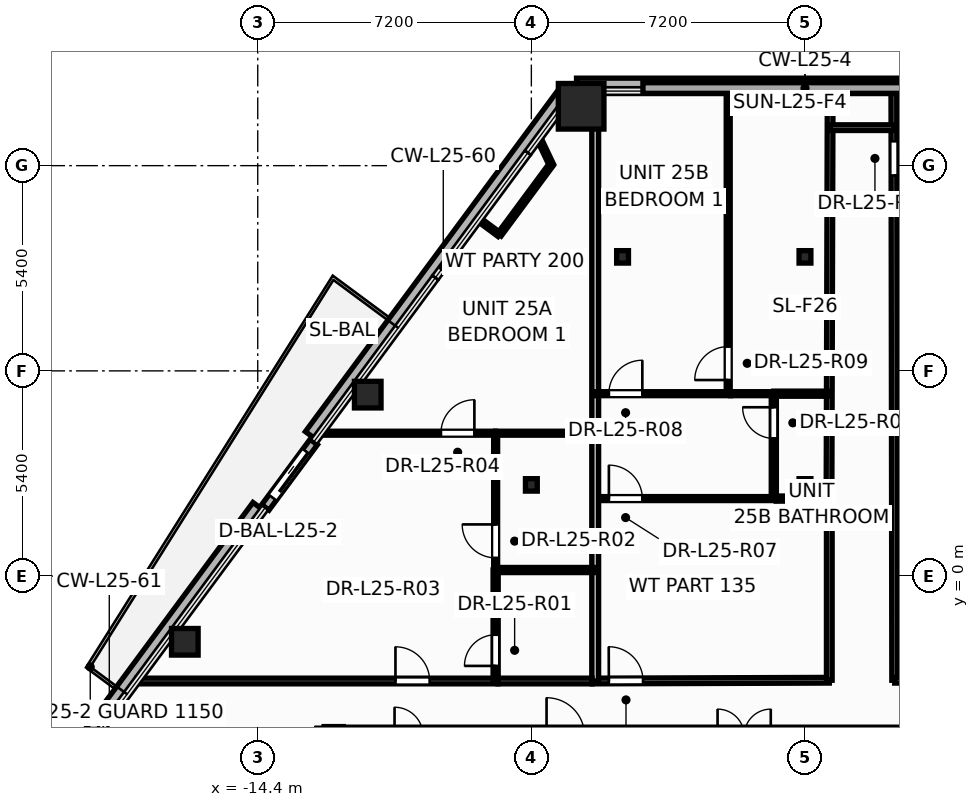
"""IFC4 building model, lengths in metres.
Left out: names, types, materials, properties, quantities, classifications, styles, units other than length and angle.
Written with IfcOpenShell. Run it as: python <this file> out.ifc"""

import sys

from ifc_helpers import new_model, si_unit, direction, frame, frame_2d, origin, origin_2d, place, context, subcontext, project, spatial, rectangle, hollow_rectangle, hollow_circle, i_section, extrude, element, fill, save


model = new_model("IFC4")
c1 = context("Model", 3, precision=1e-05, world=origin(), true_north=direction((0.0, 1.0)))
c2 = subcontext(c1, "Body", "Model", "MODEL_VIEW")
j1 = project(units=[si_unit("LENGTHUNIT", "METRE"), si_unit("PLANEANGLEUNIT", "RADIAN")], contexts=[c1])
p1 = place(None, origin())
s1 = spatial("IfcSite", under=j1, at=p1, CompositionType="ELEMENT")
p2 = place(p1, origin())
s2 = spatial("IfcBuilding", under=s1, at=p2, CompositionType="ELEMENT")
p3 = place(p2, frame((0.0, 0.0, 99.6)))
s3 = spatial("IfcBuildingStorey", under=s2, at=p3, CompositionType="ELEMENT", Elevation=99.6)
p4 = place(p3, frame((-5.89, 12.362, 0.0), z_axis=(0.0, 0.0, 1.0), x_axis=(1.0, 0.0, 0.0)))
e1 = element("IfcColumn", 1, at=p4, inside=s3, PredefinedType="COLUMN", context=c2, shape_type="SweptSolid", body=[
    extrude(hollow_rectangle(XDim=1.2, YDim=1.2, WallThickness=0.055, at=origin_2d()), origin(), (0.0, 0.0, 1.0), 3.6),
])
for number, where, z_axis, x_axis in (
    (2, (-11.506, 4.775, 0.0), (0.0, 0.0, 1.0), (1.0, 0.0, 0.0)),
    (3, (-16.319, -1.729, 0.0), (0.0, 0.0, 1.0), (1.0, 0.0, 0.0)),
):
    element("IfcColumn", number, at=place(p3, frame(where, z_axis=z_axis, x_axis=x_axis)), inside=s3, PredefinedType="COLUMN", context=c2, shape_type="SweptSolid", body=[
        extrude(hollow_circle(Radius=0.35, WallThickness=0.03, at=origin_2d()), origin(), (0.0, 0.0, 1.0), 3.6),
    ])
p5 = place(p3, frame((-12.4, -4.2, 0.0), z_axis=(0.0, 0.0, 1.0), x_axis=(1.0, 0.0, 0.0)))
e4 = element("IfcColumn", 4, at=p5, inside=s3, PredefinedType="COLUMN", context=c2, shape_type="SweptSolid", body=[
    extrude(i_section(OverallWidth=0.5, OverallDepth=0.482, WebThickness=0.04, FlangeThickness=0.045, at=origin_2d()), origin(), (0.0, 0.0, 1.0), 3.6),
])
for number, where, z_axis, x_axis in (
    (5, (-7.2, 2.4, 0.0), (0.0, 0.0, 1.0), (1.0, 0.0, 0.0)),
    (6, (0.0, 2.4, 0.0), (0.0, 0.0, 1.0), (1.0, 0.0, 0.0)),
    (7, (-4.8, 8.4, 0.0), (0.0, 0.0, 1.0), (1.0, 0.0, 0.0)),
    (8, (0.0, 8.4, 0.0), (0.0, 0.0, 1.0), (1.0, 0.0, 0.0)),
):
    element("IfcColumn", number, at=place(p3, frame(where, z_axis=z_axis, x_axis=x_axis)), inside=s3, PredefinedType="COLUMN", context=c2, shape_type="SweptSolid", body=[
        extrude(i_section(OverallWidth=0.311, OverallDepth=0.327, WebThickness=0.016, FlangeThickness=0.025, at=origin_2d()), origin(), (0.0, 0.0, 1.0), 3.6),
    ])
p6 = place(p3, frame((6.012, 12.922, -0.2), z_axis=(0.0, 0.0, 1.0), x_axis=(-1.0, 0.0, 0.0)))
e9 = element("IfcWall", 9, at=p6, inside=s3, PredefinedType="PARAPET", context=c2, shape_type="SweptSolid", body=[
    extrude(rectangle(XDim=12.023, YDim=0.36, at=frame_2d((6.012, 0.0))), origin(), (0.0, 0.0, 1.0), 0.38),
])
p7 = place(p3, frame((-6.292, 12.761, -0.2), z_axis=(0.0, 0.0, 1.0), x_axis=(-0.594907064231, -0.803794491725, 0.0)))
e10 = element("IfcWall", 10, at=p7, inside=s3, PredefinedType="PARAPET", context=c2, shape_type="SweptSolid", body=[
    extrude(rectangle(XDim=11.279, YDim=0.36, at=frame_2d((5.639, 0.0))), origin(), (0.0, 0.0, 1.0), 0.38),
])
p8 = place(p3, frame((-14.381, 1.831, -0.2), z_axis=(0.0, 0.0, 1.0), x_axis=(-0.594911761431, -0.803791015197, 0.0)))
e11 = element("IfcWall", 11, at=p8, inside=s3, PredefinedType="PARAPET", context=c2, shape_type="SweptSolid", body=[
    extrude(rectangle(XDim=13.628, YDim=0.36, at=frame_2d((6.814, 0.0))), origin(), (0.0, 0.0, 1.0), 0.38),
])
p9 = place(p3, frame((-12.926, 3.528, -0.015), z_axis=(0.0, 0.0, 1.0), x_axis=(-0.594840056707, -0.803844081235, 0.0)))
e12 = element("IfcWall", 12, at=p9, inside=s3, PredefinedType="STANDARD", context=c2, shape_type="SweptSolid", body=[
    extrude(rectangle(XDim=2.14, YDim=0.24, at=frame_2d((1.07, 0.0))), origin(), (0.0, 0.0, 1.0), 2.729),
])
p10 = place(p9, frame((0.32, 0.0, 0.015)))
e13 = element("IfcOpeningElement", 13, at=p10, cuts=e12, PredefinedType="OPENING", context=c2, shape_type="SweptSolid", body=[
    extrude(rectangle(XDim=1.506, YDim=2.204, at=frame_2d((0.75, 1.102))), frame((0.0, 0.13, 0.0), z_axis=(0.0, -1.0, 0.0), x_axis=(1.0, 0.0, 0.0)), (0.0, 0.0, 1.0), 0.26),
])
p11 = place(p3, frame((-12.65, -4.2, 0.0), z_axis=(0.0, 0.0, 1.0), x_axis=(1.0, 0.0, 0.0)))
e14 = element("IfcWall", 14, at=p11, inside=s3, PredefinedType="SHEAR", context=c2, shape_type="SweptSolid", body=[
    extrude(rectangle(XDim=25.3, YDim=0.45, at=frame_2d((12.65, 0.0))), origin(), (0.0, 0.0, 1.0), 3.6),
])
p12 = place(p11, frame((1.85, 0.0, 0.0)))
e15 = element("IfcOpeningElement", 15, at=p12, cuts=e14, PredefinedType="OPENING", context=c2, shape_type="SweptSolid", body=[
    extrude(rectangle(XDim=0.756, YDim=2.054, at=frame_2d((0.375, 1.027))), frame((0.0, 0.235, 0.0), z_axis=(0.0, -1.0, 0.0), x_axis=(1.0, 0.0, 0.0)), (0.0, 0.0, 1.0), 0.47),
])
p13 = place(p11, frame((21.85, 0.0, 0.0)))
e16 = element("IfcOpeningElement", 16, at=p13, cuts=e14, PredefinedType="OPENING", context=c2, shape_type="SweptSolid", body=[
    extrude(rectangle(XDim=0.756, YDim=2.054, at=frame_2d((0.375, 1.027))), frame((0.0, 0.235, 0.0), z_axis=(0.0, -1.0, 0.0), x_axis=(1.0, 0.0, 0.0)), (0.0, 0.0, 1.0), 0.47),
])
p14 = place(p11, frame((23.5, 0.0, 0.0)))
e17 = element("IfcOpeningElement", 17, at=p14, cuts=e14, PredefinedType="OPENING", context=c2, shape_type="SweptSolid", body=[
    extrude(rectangle(XDim=0.756, YDim=2.054, at=frame_2d((0.375, 1.027))), frame((0.0, 0.235, 0.0), z_axis=(0.0, -1.0, 0.0), x_axis=(1.0, 0.0, 0.0)), (0.0, 0.0, 1.0), 0.47),
])
p15 = place(p11, frame((5.85, 0.0, 0.0)))
e18 = element("IfcOpeningElement", 18, at=p15, cuts=e14, PredefinedType="OPENING", context=c2, shape_type="SweptSolid", body=[
    extrude(rectangle(XDim=1.006, YDim=2.104, at=frame_2d((0.5, 1.052))), frame((0.0, 0.235, 0.0), z_axis=(0.0, -1.0, 0.0), x_axis=(1.0, 0.0, 0.0)), (0.0, 0.0, 1.0), 0.47),
])
p16 = place(p11, frame((10.35, 0.0, 0.0)))
e19 = element("IfcOpeningElement", 19, at=p16, cuts=e14, PredefinedType="OPENING", context=c2, shape_type="SweptSolid", body=[
    extrude(rectangle(XDim=1.406, YDim=2.154, at=frame_2d((0.7, 1.077))), frame((0.0, 0.235, 0.0), z_axis=(0.0, -1.0, 0.0), x_axis=(1.0, 0.0, 0.0)), (0.0, 0.0, 1.0), 0.47),
])
p17 = place(p11, frame((18.45, 0.0, 0.0)))
e20 = element("IfcOpeningElement", 20, at=p17, cuts=e14, PredefinedType="OPENING", context=c2, shape_type="SweptSolid", body=[
    extrude(rectangle(XDim=1.006, YDim=2.104, at=frame_2d((0.5, 1.052))), frame((0.0, 0.235, 0.0), z_axis=(0.0, -1.0, 0.0), x_axis=(1.0, 0.0, 0.0)), (0.0, 0.0, 1.0), 0.47),
])
p18 = place(p3, frame((2.339, 12.762, 0.0), z_axis=(0.0, 0.0, 1.0), x_axis=(0.001385890916, -0.999999039653, 0.0)))
e21 = element("IfcWall", 21, at=p18, inside=s3, PredefinedType="PARTITIONING", context=c2, shape_type="SweptSolid", body=[
    extrude(rectangle(XDim=15.502, YDim=0.15, at=frame_2d((7.751, 0.0))), origin(), (0.0, 0.0, 1.0), 2.325),
])
p19 = place(p18, frame((1.322, 0.0, 0.0)))
e22 = element("IfcOpeningElement", 22, at=p19, cuts=e21, PredefinedType="OPENING", context=c2, shape_type="SweptSolid", body=[
    extrude(rectangle(XDim=0.906, YDim=2.104, at=frame_2d((0.45, 1.052))), frame((0.0, 0.085, 0.0), z_axis=(0.0, -1.0, 0.0), x_axis=(1.0, 0.0, 0.0)), (0.0, 0.0, 1.0), 0.17),
])
p20 = place(p3, frame((-17.58, -2.76, 0.0), z_axis=(0.0, 0.0, 1.0), x_axis=(1.0, 0.0, 0.0)))
e23 = element("IfcWall", 23, at=p20, inside=s3, PredefinedType="PARTITIONING", context=c2, shape_type="SweptSolid", body=[
    extrude(rectangle(XDim=9.5, YDim=0.15, at=frame_2d((4.75, 0.0))), origin(), (0.0, 0.0, 1.0), 2.713),
])
p21 = place(p20, frame((6.804, 0.0, 0.0)))
e24 = element("IfcOpeningElement", 24, at=p21, cuts=e23, PredefinedType="OPENING", context=c2, shape_type="SweptSolid", body=[
    extrude(rectangle(XDim=0.906, YDim=2.104, at=frame_2d((0.45, 1.052))), frame((0.0, 0.085, 0.0), z_axis=(0.0, -1.0, 0.0), x_axis=(1.0, 0.0, 0.0)), (0.0, 0.0, 1.0), 0.17),
])
p22 = place(p3, frame((0.632, 1.98, 0.0), z_axis=(0.0, 0.0, 1.0), x_axis=(0.002830348232, 0.999995994556, 0.0)))
e25 = element("IfcWall", 25, at=p22, inside=s3, PredefinedType="PARTITIONING", context=c2, shape_type="SweptSolid", body=[
    extrude(rectangle(XDim=10.782, YDim=0.15, at=frame_2d((5.391, 0.0))), origin(), (0.0, 0.0, 1.0), 2.325),
])
p23 = place(p3, frame((-5.52, 3.76, 0.0), z_axis=(0.0, 0.0, 1.0), x_axis=(0.0, 1.0, 0.0)))
e26 = element("IfcWall", 26, at=p23, inside=s3, PredefinedType="PARTITIONING", context=c2, shape_type="SweptSolid", body=[
    extrude(rectangle(XDim=9.002, YDim=0.18, at=frame_2d((4.501, 0.0))), origin(), (0.0, 0.0, 1.0), 2.617),
])
p24 = place(p3, frame((-2.02, 4.8, 0.0), z_axis=(0.0, 0.0, 1.0), x_axis=(0.0, 1.0, 0.0)))
e27 = element("IfcWall", 27, at=p24, inside=s3, PredefinedType="PARTITIONING", context=c2, shape_type="SweptSolid", body=[
    extrude(rectangle(XDim=7.962, YDim=0.105, at=frame_2d((3.981, 0.0))), origin(), (0.0, 0.0, 1.0), 2.617),
])
p25 = place(p24, frame((0.359, 0.0, 0.0)))
e28 = element("IfcOpeningElement", 28, at=p25, cuts=e27, PredefinedType="OPENING", context=c2, shape_type="SweptSolid", body=[
    extrude(rectangle(XDim=0.886, YDim=2.104, at=frame_2d((0.44, 1.052))), frame((0.0, 0.062, 0.0), z_axis=(0.0, -1.0, 0.0), x_axis=(1.0, 0.0, 0.0)), (0.0, 0.0, 1.0), 0.125),
])
p26 = place(p3, frame((-5.6, -2.76, 0.0), z_axis=(0.0, 0.0, 1.0), x_axis=(0.999994853563, 0.003208246723, 0.0)))
e29 = element("IfcWall", 29, at=p26, inside=s3, PredefinedType="PARTITIONING", context=c2, shape_type="SweptSolid", body=[
    extrude(rectangle(XDim=6.24, YDim=0.15, at=frame_2d((3.12, 0.0))), origin(), (0.0, 0.0, 1.0), 2.325),
])
p27 = place(p26, frame((0.439, 0.0, 0.0)))
e30 = element("IfcOpeningElement", 30, at=p27, cuts=e29, PredefinedType="OPENING", context=c2, shape_type="SweptSolid", body=[
    extrude(rectangle(XDim=0.906, YDim=2.104, at=frame_2d((0.45, 1.052))), frame((0.0, 0.085, 0.0), z_axis=(0.0, -1.0, 0.0), x_axis=(1.0, 0.0, 0.0)), (0.0, 0.0, 1.0), 0.17),
])
p28 = place(p3, frame((0.64, -2.74, 0.0), z_axis=(0.0, 0.0, 1.0), x_axis=(0.0, 1.0, 0.0)))
e31 = element("IfcWall", 31, at=p28, inside=s3, PredefinedType="PARTITIONING", context=c2, shape_type="SweptSolid", body=[
    extrude(rectangle(XDim=4.718, YDim=0.15, at=frame_2d((2.359, 0.0))), origin(), (0.0, 0.0, 1.0), 3.35),
])
p29 = place(p3, frame((-5.52, 2.04, 0.0), z_axis=(0.0, 0.0, 1.0), x_axis=(1.0, 0.0, 0.0)))
e32 = element("IfcWall", 32, at=p29, inside=s3, PredefinedType="PARTITIONING", context=c2, shape_type="SweptSolid", body=[
    extrude(rectangle(XDim=4.76, YDim=0.105, at=frame_2d((2.38, 0.0))), origin(), (0.0, 0.0, 1.0), 2.918),
])
p30 = place(p29, frame((0.36, 0.0, 0.0)))
e33 = element("IfcOpeningElement", 33, at=p30, cuts=e32, PredefinedType="OPENING", context=c2, shape_type="SweptSolid", body=[
    extrude(rectangle(XDim=0.886, YDim=2.104, at=frame_2d((0.44, 1.052))), frame((0.0, 0.062, 0.0), z_axis=(0.0, -1.0, 0.0), x_axis=(1.0, 0.0, 0.0)), (0.0, 0.0, 1.0), 0.125),
])
p31 = place(p3, frame((2.36, -2.74, 0.0), z_axis=(0.0, 0.0, 1.0), x_axis=(0.999991056007, -0.0042294097, 0.0)))
e34 = element("IfcWall", 34, at=p31, inside=s3, PredefinedType="PARTITIONING", context=c2, shape_type="SweptSolid", body=[
    extrude(rectangle(XDim=4.618, YDim=0.15, at=frame_2d((2.309, 0.0))), origin(), (0.0, 0.0, 1.0), 2.918),
])
p32 = place(p3, frame((-12.754, 3.76, 0.0), z_axis=(0.0, 0.0, 1.0), x_axis=(1.0, 0.0, 0.0)))
e35 = element("IfcWall", 35, at=p32, inside=s3, PredefinedType="PARTITIONING", context=c2, shape_type="SweptSolid", body=[
    extrude(rectangle(XDim=4.615, YDim=0.105, at=frame_2d((2.307, 0.0))), origin(), (0.0, 0.0, 1.0), 2.713),
])
p33 = place(p32, frame((3.175, 0.0, 0.0)))
e36 = element("IfcOpeningElement", 36, at=p33, cuts=e35, PredefinedType="OPENING", context=c2, shape_type="SweptSolid", body=[
    extrude(rectangle(XDim=0.886, YDim=2.104, at=frame_2d((0.44, 1.052))), frame((0.0, 0.062, 0.0), z_axis=(0.0, -1.0, 0.0), x_axis=(1.0, 0.0, 0.0)), (0.0, 0.0, 1.0), 0.125),
])
p34 = place(p3, frame((-8.14, 0.16, 0.0), z_axis=(0.0, 0.0, 1.0), x_axis=(0.0, 1.0, 0.0)))
e37 = element("IfcWall", 37, at=p34, inside=s3, PredefinedType="PARTITIONING", context=c2, shape_type="SweptSolid", body=[
    extrude(rectangle(XDim=3.6, YDim=0.105, at=frame_2d((1.8, 0.0))), origin(), (0.0, 0.0, 1.0), 2.617),
])
p35 = place(p34, frame((0.32, 0.0, 0.0)))
e38 = element("IfcOpeningElement", 38, at=p35, cuts=e37, PredefinedType="OPENING", context=c2, shape_type="SweptSolid", body=[
    extrude(rectangle(XDim=0.886, YDim=2.104, at=frame_2d((0.44, 1.052))), frame((0.0, 0.062, 0.0), z_axis=(0.0, -1.0, 0.0), x_axis=(1.0, 0.0, 0.0)), (0.0, 0.0, 1.0), 0.125),
])
p36 = place(p3, frame((-5.52, 4.8, 0.0), z_axis=(0.0, 0.0, 1.0), x_axis=(1.0, 0.0, 0.0)))
e39 = element("IfcWall", 39, at=p36, inside=s3, PredefinedType="PARTITIONING", context=c2, shape_type="SweptSolid", body=[
    extrude(rectangle(XDim=3.56, YDim=0.105, at=frame_2d((1.78, 0.0))), origin(), (0.0, 0.0, 1.0), 2.918),
])
p37 = place(p36, frame((0.36, 0.0, 0.0)))
e40 = element("IfcOpeningElement", 40, at=p37, cuts=e39, PredefinedType="OPENING", context=c2, shape_type="SweptSolid", body=[
    extrude(rectangle(XDim=0.886, YDim=2.104, at=frame_2d((0.44, 1.052))), frame((0.0, 0.062, 0.0), z_axis=(0.0, -1.0, 0.0), x_axis=(1.0, 0.0, 0.0)), (0.0, 0.0, 1.0), 0.125),
])
p38 = place(p3, frame((-8.14, -2.76, 0.0), z_axis=(0.0, 0.0, 1.0), x_axis=(0.0, 1.0, 0.0)))
e41 = element("IfcWall", 41, at=p38, inside=s3, PredefinedType="PARTITIONING", context=c2, shape_type="SweptSolid", body=[
    extrude(rectangle(XDim=2.92, YDim=0.135, at=frame_2d((1.46, 0.0))), origin(), (0.0, 0.0, 1.0), 3.35),
])
p39 = place(p38, frame((0.397, 0.0, 0.0)))
e42 = element("IfcOpeningElement", 42, at=p39, cuts=e41, PredefinedType="OPENING", context=c2, shape_type="SweptSolid", body=[
    extrude(rectangle(XDim=0.826, YDim=2.104, at=frame_2d((0.41, 1.052))), frame((0.0, 0.078, 0.0), z_axis=(0.0, -1.0, 0.0), x_axis=(1.0, 0.0, 0.0)), (0.0, 0.0, 1.0), 0.155),
])
p40 = place(p3, frame((-5.52, -2.76, 0.0), z_axis=(0.0, 0.0, 1.0), x_axis=(0.0, 1.0, 0.0)))
e43 = element("IfcWall", 43, at=p40, inside=s3, PredefinedType="PARTITIONING", context=c2, shape_type="SweptSolid", body=[
    extrude(rectangle(XDim=6.52, YDim=0.18, at=frame_2d((3.26, 0.0))), origin(), (0.0, 0.0, 1.0), 2.325),
])
p41 = place(p3, frame((-0.82, 2.04, 0.0), z_axis=(0.0, 0.0, 1.0), x_axis=(0.0, 1.0, 0.0)))
e44 = element("IfcWall", 44, at=p41, inside=s3, PredefinedType="PARTITIONING", context=c2, shape_type="SweptSolid", body=[
    extrude(rectangle(XDim=2.76, YDim=0.135, at=frame_2d((1.38, 0.0))), origin(), (0.0, 0.0, 1.0), 2.325),
])
p42 = place(p41, frame((1.583, 0.0, 0.0)))
e45 = element("IfcOpeningElement", 45, at=p42, cuts=e44, PredefinedType="OPENING", context=c2, shape_type="SweptSolid", body=[
    extrude(rectangle(XDim=0.826, YDim=2.104, at=frame_2d((0.41, 1.052))), frame((0.0, 0.078, 0.0), z_axis=(0.0, -1.0, 0.0), x_axis=(1.0, 0.0, 0.0)), (0.0, 0.0, 1.0), 0.155),
])
p43 = place(p3, frame((-8.078, -2.76, 0.0), z_axis=(0.0, 0.0, 1.0), x_axis=(1.0, 0.0, 0.0)))
e46 = element("IfcWall", 46, at=p43, inside=s3, PredefinedType="PARTITIONING", context=c2, shape_type="SweptSolid", body=[
    extrude(rectangle(XDim=2.476, YDim=0.15, at=frame_2d((1.238, 0.0))), origin(), (0.0, 0.0, 1.0), 2.325),
])
p44 = place(p3, frame((-8.14, 0.16, 0.0), z_axis=(0.0, 0.0, 1.0), x_axis=(1.0, 0.0, 0.0)))
e47 = element("IfcWall", 47, at=p44, inside=s3, PredefinedType="PARTITIONING", context=c2, shape_type="SweptSolid", body=[
    extrude(rectangle(XDim=2.62, YDim=0.135, at=frame_2d((1.31, 0.0))), origin(), (0.0, 0.0, 1.0), 2.325),
])
p45 = place(p3, frame((-8.14, 3.76, 0.0), z_axis=(0.0, 0.0, 1.0), x_axis=(1.0, 0.0, 0.0)))
e48 = element("IfcWall", 48, at=p45, inside=s3, PredefinedType="PARTITIONING", context=c2, shape_type="SweptSolid", body=[
    extrude(rectangle(XDim=2.62, YDim=0.105, at=frame_2d((1.31, 0.0))), origin(), (0.0, 0.0, 1.0), 2.617),
])
p46 = place(p3, frame((-6.677, 10.828, 0.0), z_axis=(0.0, 0.0, 1.0), x_axis=(-0.594914508596, -0.803788981924, 0.0)))
e49 = element("IfcWall", 49, at=p46, inside=s3, PredefinedType="PARTITIONING", context=c2, shape_type="SweptSolid", body=[
    extrude(rectangle(XDim=2.294, YDim=0.12, at=frame_2d((1.147, 0.0))), origin(), (0.0, 0.0, 1.0), 3.35),
])
p47 = place(p3, frame((-0.758, 2.04, 0.0), z_axis=(0.0, 0.0, 1.0), x_axis=(1.0, 0.0, 0.0)))
e50 = element("IfcWall", 50, at=p47, inside=s3, PredefinedType="PARTITIONING", context=c2, shape_type="SweptSolid", body=[
    extrude(rectangle(XDim=1.398, YDim=0.135, at=frame_2d((0.699, 0.0))), origin(), (0.0, 0.0, 1.0), 2.325),
])
p48 = place(p3, frame((-0.82, 4.8, 0.0), z_axis=(0.0, 0.0, 1.0), x_axis=(1.0, 0.0, 0.0)))
e51 = element("IfcWall", 51, at=p48, inside=s3, PredefinedType="PARTITIONING", context=c2, shape_type="SweptSolid", body=[
    extrude(rectangle(XDim=1.46, YDim=0.135, at=frame_2d((0.73, 0.0))), origin(), (0.0, 0.0, 1.0), 2.325),
])
p49 = place(p3, frame((-1.958, 4.8, 0.0), z_axis=(0.0, 0.0, 1.0), x_axis=(1.0, 0.0, 0.0)))
e52 = element("IfcWall", 52, at=p49, inside=s3, PredefinedType="PARTITIONING", context=c2, shape_type="SweptSolid", body=[
    extrude(rectangle(XDim=1.138, YDim=0.105, at=frame_2d((0.569, 0.0))), origin(), (0.0, 0.0, 1.0), 3.35),
])
p50 = place(p3, frame((0.66, 11.8, 0.0), z_axis=(0.0, 0.0, 1.0), x_axis=(1.0, 0.0, 0.0)))
e53 = element("IfcWall", 53, at=p50, inside=s3, PredefinedType="PARTITIONING", context=c2, shape_type="SweptSolid", body=[
    extrude(rectangle(XDim=1.68, YDim=0.15, at=frame_2d((0.84, 0.0))), origin(), (0.0, 0.0, 1.0), 3.35),
])
p51 = place(p3, frame((-7.003, 11.514, 0.0), z_axis=(0.0, 0.0, 1.0), x_axis=(0.429247003256, -0.903187140185, 0.0)))
e54 = element("IfcWall", 54, at=p51, inside=s3, PredefinedType="PARTITIONING", context=c2, shape_type="SweptSolid", body=[
    extrude(rectangle(XDim=0.759, YDim=0.12, at=frame_2d((0.38, 0.0))), origin(), (0.0, 0.0, 1.0), 2.713),
])
p52 = place(p3, frame((-8.042, 8.984, 0.0), z_axis=(0.0, 0.0, 1.0), x_axis=(-0.803615295139, 0.595149105198, 0.0)))
e55 = element("IfcWall", 55, at=p52, inside=s3, PredefinedType="PARTITIONING", context=c2, shape_type="SweptSolid", body=[
    extrude(rectangle(XDim=0.67, YDim=0.12, at=frame_2d((0.335, 0.0))), origin(), (0.0, 0.0, 1.0), 2.713),
])
p53 = place(p10, origin())
e56 = element("IfcDoor", 56, at=p53, inside=s3, OperationType="SLIDING_TO_RIGHT", PredefinedType="DOOR", context=c2, shape_type="SweptSolid", body=[
    extrude(rectangle(XDim=1.5, YDim=2.2, at=frame_2d((0.75, 1.1))), frame((0.0, 0.025, 0.0), z_axis=(0.0, -1.0, 0.0), x_axis=(1.0, 0.0, 0.0)), (0.0, 0.0, 1.0), 0.05),
])
fill(e13, e56)
p54 = place(p39, origin())
e57 = element("IfcDoor", 57, at=p54, inside=s3, OperationType="SINGLE_SWING_LEFT", PredefinedType="DOOR", context=c2, shape_type="SweptSolid", body=[
    extrude(rectangle(XDim=0.82, YDim=2.1, at=frame_2d((0.41, 1.05))), frame((0.0, 0.025, 0.0), z_axis=(0.0, -1.0, 0.0), x_axis=(1.0, 0.0, 0.0)), (0.0, 0.0, 1.0), 0.05),
])
fill(e42, e57)
p55 = place(p35, origin())
e58 = element("IfcDoor", 58, at=p55, inside=s3, OperationType="SINGLE_SWING_RIGHT", PredefinedType="DOOR", context=c2, shape_type="SweptSolid", body=[
    extrude(rectangle(XDim=0.88, YDim=2.1, at=frame_2d((0.44, 1.05))), frame((0.0, 0.025, 0.0), z_axis=(0.0, -1.0, 0.0), x_axis=(1.0, 0.0, 0.0)), (0.0, 0.0, 1.0), 0.05),
])
fill(e38, e58)
p56 = place(p21, origin())
e59 = element("IfcDoor", 59, at=p56, inside=s3, OperationType="SINGLE_SWING_LEFT", PredefinedType="DOOR", context=c2, shape_type="SweptSolid", body=[
    extrude(rectangle(XDim=0.9, YDim=2.1, at=frame_2d((0.45, 1.05))), frame((0.0, 0.025, 0.0), z_axis=(0.0, -1.0, 0.0), x_axis=(1.0, 0.0, 0.0)), (0.0, 0.0, 1.0), 0.05),
])
fill(e24, e59)
p57 = place(p33, origin())
e60 = element("IfcDoor", 60, at=p57, inside=s3, OperationType="SINGLE_SWING_RIGHT", PredefinedType="DOOR", context=c2, shape_type="SweptSolid", body=[
    extrude(rectangle(XDim=0.88, YDim=2.1, at=frame_2d((0.44, 1.05))), frame((0.0, 0.025, 0.0), z_axis=(0.0, -1.0, 0.0), x_axis=(1.0, 0.0, 0.0)), (0.0, 0.0, 1.0), 0.05),
])
fill(e36, e60)
p58 = place(p27, origin())
e61 = element("IfcDoor", 61, at=p58, inside=s3, OperationType="SINGLE_SWING_LEFT", PredefinedType="DOOR", context=c2, shape_type="SweptSolid", body=[
    extrude(rectangle(XDim=0.9, YDim=2.1, at=frame_2d((0.45, 1.05))), frame((0.0, 0.025, 0.0), z_axis=(0.0, -1.0, 0.0), x_axis=(1.0, 0.0, 0.0)), (0.0, 0.0, 1.0), 0.05),
])
fill(e30, e61)
p59 = place(p42, origin())
e62 = element("IfcDoor", 62, at=p59, inside=s3, OperationType="SINGLE_SWING_RIGHT", PredefinedType="DOOR", context=c2, shape_type="SweptSolid", body=[
    extrude(rectangle(XDim=0.82, YDim=2.1, at=frame_2d((0.41, 1.05))), frame((0.0, 0.025, 0.0), z_axis=(0.0, -1.0, 0.0), x_axis=(1.0, 0.0, 0.0)), (0.0, 0.0, 1.0), 0.05),
])
fill(e45, e62)
p60 = place(p30, origin())
e63 = element("IfcDoor", 63, at=p60, inside=s3, OperationType="SINGLE_SWING_LEFT", PredefinedType="DOOR", context=c2, shape_type="SweptSolid", body=[
    extrude(rectangle(XDim=0.88, YDim=2.1, at=frame_2d((0.44, 1.05))), frame((0.0, 0.025, 0.0), z_axis=(0.0, -1.0, 0.0), x_axis=(1.0, 0.0, 0.0)), (0.0, 0.0, 1.0), 0.05),
])
fill(e33, e63)
p61 = place(p37, origin())
e64 = element("IfcDoor", 64, at=p61, inside=s3, OperationType="SINGLE_SWING_RIGHT", PredefinedType="DOOR", context=c2, shape_type="SweptSolid", body=[
    extrude(rectangle(XDim=0.88, YDim=2.1, at=frame_2d((0.44, 1.05))), frame((0.0, 0.025, 0.0), z_axis=(0.0, -1.0, 0.0), x_axis=(1.0, 0.0, 0.0)), (0.0, 0.0, 1.0), 0.05),
])
fill(e40, e64)
p62 = place(p25, origin())
e65 = element("IfcDoor", 65, at=p62, inside=s3, OperationType="SINGLE_SWING_LEFT", PredefinedType="DOOR", context=c2, shape_type="SweptSolid", body=[
    extrude(rectangle(XDim=0.88, YDim=2.1, at=frame_2d((0.44, 1.05))), frame((0.0, 0.025, 0.0), z_axis=(0.0, -1.0, 0.0), x_axis=(1.0, 0.0, 0.0)), (0.0, 0.0, 1.0), 0.05),
])
fill(e28, e65)
p63 = place(p19, origin())
e66 = element("IfcDoor", 66, at=p63, inside=s3, OperationType="SINGLE_SWING_RIGHT", PredefinedType="DOOR", context=c2, shape_type="SweptSolid", body=[
    extrude(rectangle(XDim=0.9, YDim=2.1, at=frame_2d((0.45, 1.05))), frame((0.0, 0.025, 0.0), z_axis=(0.0, -1.0, 0.0), x_axis=(1.0, 0.0, 0.0)), (0.0, 0.0, 1.0), 0.05),
])
fill(e22, e66)
save(model, sys.argv[1])
